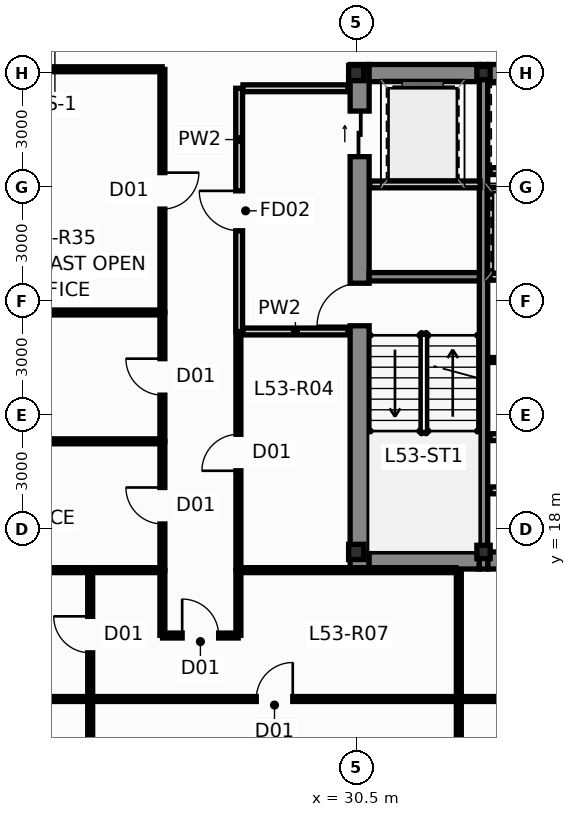
"""IFC4 building model, lengths in metres.
Left out: names, types, materials, properties, quantities, classifications, styles, units other than length and angle.
Written with IfcOpenShell. Run it as: python <this file> out.ifc"""

import sys

from ifc_helpers import new_model, si_unit, direction, frame, frame_2d, origin, origin_2d, place, context, subcontext, project, spatial, rectangle, hollow_rectangle, i_section, extrude, source, transform, mapped, element, fill, save


model = new_model("IFC4")
c1 = context("Model", 3, precision=1e-05, world=origin(), true_north=direction((0.0, 1.0)))
c2 = subcontext(c1, "Body", "Model", "MODEL_VIEW")
j1 = project(units=[si_unit("LENGTHUNIT", "METRE"), si_unit("PLANEANGLEUNIT", "RADIAN")], contexts=[c1])
p1 = place(None, origin())
s1 = spatial("IfcSite", under=j1, at=p1, CompositionType="ELEMENT")
p2 = place(p1, origin())
s2 = spatial("IfcBuilding", under=s1, at=p2, CompositionType="ELEMENT")
p3 = place(p2, frame((0.0, 0.0, 202.3)))
s3 = spatial("IfcBuildingStorey", under=s2, at=p3, CompositionType="ELEMENT", Elevation=202.3)
m1 = source(origin(), c2, "Body", "SweptSolid", [
    extrude(i_section(OverallWidth=0.4, OverallDepth=0.4, WebThickness=0.02, FlangeThickness=0.032, at=origin_2d()), origin(), (0.0, 0.0, 1.0), 3.65),
])
for number, where, z_axis, x_axis in (
    (1, (30.5, 17.4, 0.0), (0.0, 0.0, 1.0), (1.0, 0.0, 0.0)),
    (2, (30.5, 30.0, 0.0), (0.0, 0.0, 1.0), (1.0, 0.0, 0.0)),
):
    element("IfcColumn", number, at=place(p3, frame(where, z_axis=z_axis, x_axis=x_axis)), inside=s3, PredefinedType="COLUMN", context=c2, shape_type="MappedRepresentation", body=[
        mapped(m1, transform((0.0, 0.0, 0.0), scale=1.0)),
    ])
m2 = source(origin(), c2, "Body", "SweptSolid", [
    extrude(hollow_rectangle(XDim=0.35, YDim=0.35, WallThickness=0.016, at=origin_2d()), origin(), (0.0, 0.0, 1.0), 3.65),
])
for number, where, z_axis, x_axis in (
    (3, (33.85, 17.4, 0.0), (0.0, 0.0, 1.0), (1.0, 0.0, 0.0)),
    (4, (33.85, 30.0, 0.0), (0.0, 0.0, 1.0), (1.0, 0.0, 0.0)),
):
    element("IfcColumn", number, at=place(p3, frame(where, z_axis=z_axis, x_axis=x_axis)), inside=s3, PredefinedType="COLUMN", context=c2, shape_type="MappedRepresentation", body=[
        mapped(m2, transform((0.0, 0.0, 0.0), scale=1.0)),
    ])
p4 = place(p3, frame((30.59, 16.95, 0.0), z_axis=(0.0, 0.0, 1.0), x_axis=(0.0, 1.0, 0.0)))
e5 = element("IfcWall", 5, at=p4, inside=s3, PredefinedType="SHEAR", context=c2, shape_type="SweptSolid", body=[
    extrude(rectangle(XDim=13.275, YDim=0.5, at=frame_2d((6.638, 0.0))), origin(), (0.0, 0.0, 1.0), 3.65),
])
p5 = place(p4, frame((6.4, 0.0, 0.0)))
e6 = element("IfcOpeningElement", 6, at=p5, cuts=e5, PredefinedType="OPENING", context=c2, shape_type="SweptSolid", body=[
    extrude(rectangle(XDim=1.12, YDim=2.15, at=frame_2d((0.56, 1.075))), frame((0.0, 0.262, 0.0), z_axis=(0.0, -1.0, 0.0), x_axis=(1.0, 0.0, 0.0)), (0.0, 0.0, 1.0), 0.524),
])
p6 = place(p4, frame((10.85, 0.0, 0.0)))
e7 = element("IfcOpeningElement", 7, at=p6, cuts=e5, PredefinedType="OPENING", context=c2, shape_type="SweptSolid", body=[
    extrude(rectangle(XDim=1.2, YDim=2.2, at=frame_2d((0.6, 1.1))), frame((0.0, 0.262, 0.0), z_axis=(0.0, -1.0, 0.0), x_axis=(1.0, 0.0, 0.0)), (0.0, 0.0, 1.0), 0.524),
])
p7 = place(p3, frame((30.84, 17.175, 0.0), z_axis=(0.0, 0.0, 1.0), x_axis=(1.0, 0.0, 0.0)))
e8 = element("IfcWall", 8, at=p7, inside=s3, PredefinedType="SHEAR", context=c2, shape_type="SweptSolid", body=[
    extrude(rectangle(XDim=2.9, YDim=0.45, at=frame_2d((1.45, 0.0))), origin(), (0.0, 0.0, 1.0), 3.65),
])
p8 = place(p3, frame((33.96, 17.175, 0.0), z_axis=(0.0, 0.0, 1.0), x_axis=(1.0, 0.0, 0.0)))
e9 = element("IfcWall", 9, at=p8, inside=s3, PredefinedType="SHEAR", context=c2, shape_type="SweptSolid", body=[
    extrude(rectangle(XDim=8.08, YDim=0.45, at=frame_2d((4.04, 0.0))), origin(), (0.0, 0.0, 1.0), 3.65),
])
p9 = place(p3, frame((30.84, 30.0, 0.0), z_axis=(0.0, 0.0, 1.0), x_axis=(1.0, 0.0, 0.0)))
e10 = element("IfcWall", 10, at=p9, inside=s3, PredefinedType="SHEAR", context=c2, shape_type="SweptSolid", body=[
    extrude(rectangle(XDim=2.9, YDim=0.45, at=frame_2d((1.45, 0.0))), origin(), (0.0, 0.0, 1.0), 3.65),
])
p10 = place(p3, frame((33.96, 30.0, 0.0), z_axis=(0.0, 0.0, 1.0), x_axis=(1.0, 0.0, 0.0)))
e11 = element("IfcWall", 11, at=p10, inside=s3, PredefinedType="SHEAR", context=c2, shape_type="SweptSolid", body=[
    extrude(rectangle(XDim=3.78, YDim=0.45, at=frame_2d((1.89, 0.0))), origin(), (0.0, 0.0, 1.0), 3.65),
])
p11 = place(p3, frame((33.85, 16.95, 0.0), z_axis=(0.0, 0.0, 1.0), x_axis=(0.0, 1.0, 0.0)))
e12 = element("IfcWall", 12, at=p11, inside=s3, PredefinedType="SHEAR", context=c2, shape_type="SweptSolid", body=[
    extrude(rectangle(XDim=13.275, YDim=0.22, at=frame_2d((6.638, 0.0))), origin(), (0.0, 0.0, 1.0), 3.65),
])
p12 = place(p3, frame((30.84, 24.64, 0.0), z_axis=(0.0, 0.0, 1.0), x_axis=(1.0, 0.0, 0.0)))
e13 = element("IfcWall", 13, at=p12, inside=s3, PredefinedType="SHEAR", context=c2, shape_type="SweptSolid", body=[
    extrude(rectangle(XDim=2.9, YDim=0.22, at=frame_2d((1.45, 0.0))), origin(), (0.0, 0.0, 1.0), 3.65),
])
p13 = place(p3, frame((34.02, 26.9, 0.0), z_axis=(0.0, 0.0, 1.0), x_axis=(1.0, 0.0, 0.0)))
e14 = element("IfcWall", 14, at=p13, inside=s3, PredefinedType="PARTITIONING", context=c2, shape_type="SweptSolid", body=[
    extrude(rectangle(XDim=3.6, YDim=0.18, at=frame_2d((1.8, 0.0))), origin(), (0.0, 0.0, 1.0), 3.4),
])
p14 = place(p13, frame((0.3, 0.0, 0.0)))
e15 = element("IfcOpeningElement", 15, at=p14, cuts=e14, PredefinedType="OPENING", context=c2, shape_type="SweptSolid", body=[
    extrude(rectangle(XDim=1.15, YDim=2.2, at=frame_2d((0.575, 1.1))), frame((0.0, 0.102, 0.0), z_axis=(0.0, -1.0, 0.0), x_axis=(1.0, 0.0, 0.0)), (0.0, 0.0, 1.0), 0.204),
])
p15 = place(p13, frame((2.1, 0.0, 0.0)))
e16 = element("IfcOpeningElement", 16, at=p15, cuts=e14, PredefinedType="OPENING", context=c2, shape_type="SweptSolid", body=[
    extrude(rectangle(XDim=1.15, YDim=2.2, at=frame_2d((0.575, 1.1))), frame((0.0, 0.102, 0.0), z_axis=(0.0, -1.0, 0.0), x_axis=(1.0, 0.0, 0.0)), (0.0, 0.0, 1.0), 0.204),
])
p16 = place(p3, frame((34.02, 24.64, 0.0), z_axis=(0.0, 0.0, 1.0), x_axis=(1.0, 0.0, 0.0)))
e17 = element("IfcWall", 17, at=p16, inside=s3, PredefinedType="PARTITIONING", context=c2, shape_type="SweptSolid", body=[
    extrude(rectangle(XDim=3.68, YDim=0.18, at=frame_2d((1.84, 0.0))), origin(), (0.0, 0.0, 1.0), 3.4),
])
p17 = place(p3, frame((34.02, 27.42, 0.0), z_axis=(0.0, 0.0, 1.0), x_axis=(1.0, 0.0, 0.0)))
e18 = element("IfcWall", 18, at=p17, inside=s3, PredefinedType="PARTITIONING", context=c2, shape_type="SweptSolid", body=[
    extrude(rectangle(XDim=3.66, YDim=0.18, at=frame_2d((1.83, 0.0))), origin(), (0.0, 0.0, 1.0), 3.4),
])
p18 = place(p3, frame((27.42, 23.2, 0.0), z_axis=(0.0, 0.0, 1.0), x_axis=(0.0, 1.0, 0.0)))
e19 = element("IfcWall", 19, at=p18, inside=s3, PredefinedType="PARTITIONING", context=c2, shape_type="SweptSolid", body=[
    extrude(rectangle(XDim=6.4, YDim=0.18, at=frame_2d((3.2, 0.0))), origin(), (0.0, 0.0, 1.0), 3.078),
])
p19 = place(p18, frame((2.65, 0.0, 0.0)))
e20 = element("IfcOpeningElement", 20, at=p19, cuts=e19, PredefinedType="OPENING", context=c2, shape_type="SweptSolid", body=[
    extrude(rectangle(XDim=1.05, YDim=2.15, at=frame_2d((0.525, 1.075))), frame((0.0, 0.102, 0.0), z_axis=(0.0, -1.0, 0.0), x_axis=(1.0, 0.0, 0.0)), (0.0, 0.0, 1.0), 0.204),
])
p20 = place(p3, frame((27.52, 23.2, 0.0), z_axis=(0.0, 0.0, 1.0), x_axis=(1.0, 0.0, 0.0)))
e21 = element("IfcWall", 21, at=p20, inside=s3, PredefinedType="PARTITIONING", context=c2, shape_type="SweptSolid", body=[
    extrude(rectangle(XDim=2.76, YDim=0.18, at=frame_2d((1.38, 0.0))), origin(), (0.0, 0.0, 1.0), 3.4),
])
p21 = place(p3, frame((27.52, 29.6, 0.0), z_axis=(0.0, 0.0, 1.0), x_axis=(1.0, 0.0, 0.0)))
e22 = element("IfcWall", 22, at=p21, inside=s3, PredefinedType="PARTITIONING", context=c2, shape_type="SweptSolid", body=[
    extrude(rectangle(XDim=2.76, YDim=0.18, at=frame_2d((1.38, 0.0))), origin(), (0.0, 0.0, 1.0), 2.925),
])
p22 = place(p3, frame((30.86, 27.07, 0.0), z_axis=(0.0, 0.0, 1.0), x_axis=(1.0, 0.0, 0.0)))
e23 = element("IfcWall", 23, at=p22, inside=s3, PredefinedType="PARTITIONING", context=c2, shape_type="SweptSolid", body=[
    extrude(rectangle(XDim=2.9, YDim=0.18, at=frame_2d((1.45, 0.0))), origin(), (0.0, 0.0, 1.0), 3.4),
])
p23 = place(p3, frame((34.02, 20.42, 0.0), z_axis=(0.0, 0.0, 1.0), x_axis=(1.0, 0.0, 0.0)))
e24 = element("IfcWall", 24, at=p23, inside=s3, PredefinedType="PARTITIONING", context=c2, shape_type="SweptSolid", body=[
    extrude(rectangle(XDim=3.64, YDim=0.18, at=frame_2d((1.82, 0.0))), origin(), (0.0, 0.0, 1.0), 3.4),
])
p24 = place(p3, frame((34.02, 22.45, 0.0), z_axis=(0.0, 0.0, 1.0), x_axis=(1.0, 0.0, 0.0)))
e25 = element("IfcWall", 25, at=p24, inside=s3, PredefinedType="PARTITIONING", context=c2, shape_type="SweptSolid", body=[
    extrude(rectangle(XDim=3.58, YDim=0.13, at=frame_2d((1.79, 0.0))), origin(), (0.0, 0.0, 1.0), 3.4),
])
p25 = place(p3, frame((34.02, 19.02, 0.0), z_axis=(0.0, 0.0, 1.0), x_axis=(1.0, 0.0, 0.0)))
e26 = element("IfcWall", 26, at=p25, inside=s3, PredefinedType="PARTITIONING", context=c2, shape_type="SweptSolid", body=[
    extrude(rectangle(XDim=3.58, YDim=0.18, at=frame_2d((1.79, 0.0))), origin(), (0.0, 0.0, 1.0), 3.4),
])
p26 = place(p3, frame((12.078, 13.53, 0.0), z_axis=(0.0, 0.0, 1.0), x_axis=(1.0, 0.0, 0.0)))
e27 = element("IfcWall", 27, at=p26, inside=s3, PredefinedType="PARTITIONING", context=c2, shape_type="SweptSolid", body=[
    extrude(rectangle(XDim=11.417, YDim=0.13, at=frame_2d((5.708, 0.0))), origin(), (0.0, 0.0, 1.0), 3.4),
])
p27 = place(p26, frame((5.283, 0.0, 0.0)))
e28 = element("IfcOpeningElement", 28, at=p27, cuts=e27, PredefinedType="OPENING", context=c2, shape_type="SweptSolid", body=[
    extrude(rectangle(XDim=0.96, YDim=2.15, at=frame_2d((0.48, 1.075))), frame((0.0, 0.077, 0.0), z_axis=(0.0, -1.0, 0.0), x_axis=(1.0, 0.0, 0.0)), (0.0, 0.0, 1.0), 0.154),
])
p28 = place(p3, frame((23.505, 13.53, 0.0), z_axis=(0.0, 0.0, 1.0), x_axis=(1.0, 0.0, 0.0)))
e29 = element("IfcWall", 29, at=p28, inside=s3, PredefinedType="PARTITIONING", context=c2, shape_type="SweptSolid", body=[
    extrude(rectangle(XDim=9.69, YDim=0.13, at=frame_2d((4.845, 0.0))), origin(), (0.0, 0.0, 1.0), 3.078),
])
p29 = place(p28, frame((4.365, 0.0, 0.0)))
e30 = element("IfcOpeningElement", 30, at=p29, cuts=e29, PredefinedType="OPENING", context=c2, shape_type="SweptSolid", body=[
    extrude(rectangle(XDim=0.96, YDim=2.15, at=frame_2d((0.48, 1.075))), frame((0.0, 0.077, 0.0), z_axis=(0.0, -1.0, 0.0), x_axis=(1.0, 0.0, 0.0)), (0.0, 0.0, 1.0), 0.154),
])
p30 = place(p3, frame((33.205, 13.53, 0.0), z_axis=(0.0, 0.0, 1.0), x_axis=(1.0, 0.0, 0.0)))
e31 = element("IfcWall", 31, at=p30, inside=s3, PredefinedType="PARTITIONING", context=c2, shape_type="SweptSolid", body=[
    extrude(rectangle(XDim=9.59, YDim=0.13, at=frame_2d((4.795, 0.0))), origin(), (0.0, 0.0, 1.0), 3.078),
])
p31 = place(p30, frame((4.315, 0.0, 0.0)))
e32 = element("IfcOpeningElement", 32, at=p31, cuts=e31, PredefinedType="OPENING", context=c2, shape_type="SweptSolid", body=[
    extrude(rectangle(XDim=0.96, YDim=2.15, at=frame_2d((0.48, 1.075))), frame((0.0, 0.077, 0.0), z_axis=(0.0, -1.0, 0.0), x_axis=(1.0, 0.0, 0.0)), (0.0, 0.0, 1.0), 0.154),
])
p32 = place(p3, frame((14.069, 16.92, 0.0), z_axis=(0.0, 0.0, 1.0), x_axis=(1.0, 0.0, 0.0)))
e33 = element("IfcWall", 33, at=p32, inside=s3, PredefinedType="PARTITIONING", context=c2, shape_type="SweptSolid", body=[
    extrude(rectangle(XDim=9.426, YDim=0.13, at=frame_2d((4.713, 0.0))), origin(), (0.0, 0.0, 1.0), 2.925),
])
p33 = place(p3, frame((16.06, 20.31, 0.0), z_axis=(0.0, 0.0, 1.0), x_axis=(1.0, 0.0, 0.0)))
e34 = element("IfcWall", 34, at=p33, inside=s3, PredefinedType="PARTITIONING", context=c2, shape_type="SweptSolid", body=[
    extrude(rectangle(XDim=9.335, YDim=0.13, at=frame_2d((4.667, 0.0))), origin(), (0.0, 0.0, 1.0), 3.4),
])
p34 = place(p3, frame((18.051, 23.7, 0.0), z_axis=(0.0, 0.0, 1.0), x_axis=(1.0, 0.0, 0.0)))
e35 = element("IfcWall", 35, at=p34, inside=s3, PredefinedType="PARTITIONING", context=c2, shape_type="SweptSolid", body=[
    extrude(rectangle(XDim=7.344, YDim=0.13, at=frame_2d((3.672, 0.0))), origin(), (0.0, 0.0, 1.0), 3.4),
])
p35 = place(p3, frame((25.4, 30.095, 0.0), z_axis=(0.0, 0.0, 1.0), x_axis=(0.0, -1.0, 0.0)))
e36 = element("IfcWall", 36, at=p35, inside=s3, PredefinedType="PARTITIONING", context=c2, shape_type="SweptSolid", body=[
    extrude(rectangle(XDim=6.39, YDim=0.13, at=frame_2d((3.195, 0.0))), origin(), (0.0, 0.0, 1.0), 3.078),
])
p36 = place(p35, frame((2.715, 0.0, 0.0)))
e37 = element("IfcOpeningElement", 37, at=p36, cuts=e36, PredefinedType="OPENING", context=c2, shape_type="SweptSolid", body=[
    extrude(rectangle(XDim=0.96, YDim=2.15, at=frame_2d((0.48, 1.075))), frame((0.0, 0.077, 0.0), z_axis=(0.0, -1.0, 0.0), x_axis=(1.0, 0.0, 0.0)), (0.0, 0.0, 1.0), 0.154),
])
p37 = place(p3, frame((27.4, 16.925, 0.0), z_axis=(0.0, 0.0, 1.0), x_axis=(0.0, 1.0, 0.0)))
e38 = element("IfcWall", 38, at=p37, inside=s3, PredefinedType="PARTITIONING", context=c2, shape_type="SweptSolid", body=[
    extrude(rectangle(XDim=6.18, YDim=0.13, at=frame_2d((3.09, 0.0))), origin(), (0.0, 0.0, 1.0), 3.078),
])
p38 = place(p37, frame((2.61, 0.0, 0.0)))
e39 = element("IfcOpeningElement", 39, at=p38, cuts=e38, PredefinedType="OPENING", context=c2, shape_type="SweptSolid", body=[
    extrude(rectangle(XDim=0.96, YDim=2.15, at=frame_2d((0.48, 1.075))), frame((0.0, 0.077, 0.0), z_axis=(0.0, -1.0, 0.0), x_axis=(1.0, 0.0, 0.0)), (0.0, 0.0, 1.0), 0.154),
])
p39 = place(p3, frame((27.405, 16.92, 0.0), z_axis=(0.0, 0.0, 1.0), x_axis=(1.0, 0.0, 0.0)))
e40 = element("IfcWall", 40, at=p39, inside=s3, PredefinedType="PARTITIONING", context=c2, shape_type="SweptSolid", body=[
    extrude(rectangle(XDim=5.72, YDim=0.13, at=frame_2d((2.86, 0.0))), origin(), (0.0, 0.0, 1.0), 2.925),
])
p40 = place(p3, frame((21.81, 30.1, 0.0), z_axis=(0.0, 0.0, 1.0), x_axis=(1.0, 0.0, 0.0)))
e41 = element("IfcWall", 41, at=p40, inside=s3, PredefinedType="PARTITIONING", context=c2, shape_type="SweptSolid", body=[
    extrude(rectangle(XDim=3.585, YDim=0.13, at=frame_2d((1.793, 0.0))), origin(), (0.0, 0.0, 1.0), 3.4),
])
p41 = place(p3, frame((23.5, 13.535, 0.0), z_axis=(0.0, 0.0, 1.0), x_axis=(0.0, 1.0, 0.0)))
e42 = element("IfcWall", 42, at=p41, inside=s3, PredefinedType="PARTITIONING", context=c2, shape_type="SweptSolid", body=[
    extrude(rectangle(XDim=3.38, YDim=0.13, at=frame_2d((1.69, 0.0))), origin(), (0.0, 0.0, 1.0), 3.4),
])
p42 = place(p41, frame((1.21, 0.0, 0.0)))
e43 = element("IfcOpeningElement", 43, at=p42, cuts=e42, PredefinedType="OPENING", context=c2, shape_type="SweptSolid", body=[
    extrude(rectangle(XDim=0.96, YDim=2.15, at=frame_2d((0.48, 1.075))), frame((0.0, 0.077, 0.0), z_axis=(0.0, -1.0, 0.0), x_axis=(1.0, 0.0, 0.0)), (0.0, 0.0, 1.0), 0.154),
])
p43 = place(p3, frame((33.2, 13.535, 0.0), z_axis=(0.0, 0.0, 1.0), x_axis=(0.0, 1.0, 0.0)))
e44 = element("IfcWall", 44, at=p43, inside=s3, PredefinedType="PARTITIONING", context=c2, shape_type="SweptSolid", body=[
    extrude(rectangle(XDim=3.31, YDim=0.13, at=frame_2d((1.655, 0.0))), origin(), (0.0, 0.0, 1.0), 3.4),
])
p44 = place(p3, frame((25.4, 20.315, 0.0), z_axis=(0.0, 0.0, 1.0), x_axis=(0.0, 1.0, 0.0)))
e45 = element("IfcWall", 45, at=p44, inside=s3, PredefinedType="PARTITIONING", context=c2, shape_type="SweptSolid", body=[
    extrude(rectangle(XDim=3.38, YDim=0.13, at=frame_2d((1.69, 0.0))), origin(), (0.0, 0.0, 1.0), 3.078),
])
p45 = place(p44, frame((1.21, 0.0, 0.0)))
e46 = element("IfcOpeningElement", 46, at=p45, cuts=e45, PredefinedType="OPENING", context=c2, shape_type="SweptSolid", body=[
    extrude(rectangle(XDim=0.96, YDim=2.15, at=frame_2d((0.48, 1.075))), frame((0.0, 0.077, 0.0), z_axis=(0.0, -1.0, 0.0), x_axis=(1.0, 0.0, 0.0)), (0.0, 0.0, 1.0), 0.154),
])
p46 = place(p3, frame((23.5, 10.145, 0.0), z_axis=(0.0, 0.0, 1.0), x_axis=(0.0, 1.0, 0.0)))
e47 = element("IfcWall", 47, at=p46, inside=s3, PredefinedType="PARTITIONING", context=c2, shape_type="SweptSolid", body=[
    extrude(rectangle(XDim=3.38, YDim=0.13, at=frame_2d((1.69, 0.0))), origin(), (0.0, 0.0, 1.0), 3.4),
])
p47 = place(p3, frame((33.2, 10.145, 0.0), z_axis=(0.0, 0.0, 1.0), x_axis=(0.0, 1.0, 0.0)))
e48 = element("IfcWall", 48, at=p47, inside=s3, PredefinedType="PARTITIONING", context=c2, shape_type="SweptSolid", body=[
    extrude(rectangle(XDim=3.38, YDim=0.13, at=frame_2d((1.69, 0.0))), origin(), (0.0, 0.0, 1.0), 3.4),
])
p48 = place(p47, frame((1.21, 0.0, 0.0)))
e49 = element("IfcOpeningElement", 49, at=p48, cuts=e48, PredefinedType="OPENING", context=c2, shape_type="SweptSolid", body=[
    extrude(rectangle(XDim=0.96, YDim=2.15, at=frame_2d((0.48, 1.075))), frame((0.0, 0.077, 0.0), z_axis=(0.0, -1.0, 0.0), x_axis=(1.0, 0.0, 0.0)), (0.0, 0.0, 1.0), 0.154),
])
p49 = place(p3, frame((25.4, 16.925, 0.0), z_axis=(0.0, 0.0, 1.0), x_axis=(0.0, 1.0, 0.0)))
e50 = element("IfcWall", 50, at=p49, inside=s3, PredefinedType="PARTITIONING", context=c2, shape_type="SweptSolid", body=[
    extrude(rectangle(XDim=3.38, YDim=0.13, at=frame_2d((1.69, 0.0))), origin(), (0.0, 0.0, 1.0), 3.078),
])
p50 = place(p49, frame((1.21, 0.0, 0.0)))
e51 = element("IfcOpeningElement", 51, at=p50, cuts=e50, PredefinedType="OPENING", context=c2, shape_type="SweptSolid", body=[
    extrude(rectangle(XDim=0.96, YDim=2.15, at=frame_2d((0.48, 1.075))), frame((0.0, 0.077, 0.0), z_axis=(0.0, -1.0, 0.0), x_axis=(1.0, 0.0, 0.0)), (0.0, 0.0, 1.0), 0.154),
])
p51 = place(p3, frame((25.405, 15.2, 0.0), z_axis=(0.0, 0.0, 1.0), x_axis=(1.0, 0.0, 0.0)))
e52 = element("IfcWall", 52, at=p51, inside=s3, PredefinedType="PARTITIONING", context=c2, shape_type="SweptSolid", body=[
    extrude(rectangle(XDim=1.99, YDim=0.13, at=frame_2d((0.995, 0.0))), origin(), (0.0, 0.0, 1.0), 3.4),
])
p52 = place(p51, frame((0.515, 0.0, 0.0)))
e53 = element("IfcOpeningElement", 53, at=p52, cuts=e52, PredefinedType="OPENING", context=c2, shape_type="SweptSolid", body=[
    extrude(rectangle(XDim=0.96, YDim=2.15, at=frame_2d((0.48, 1.075))), frame((0.0, 0.077, 0.0), z_axis=(0.0, -1.0, 0.0), x_axis=(1.0, 0.0, 0.0)), (0.0, 0.0, 1.0), 0.154),
])
p53 = place(p3, frame((23.505, 16.92, 0.0), z_axis=(0.0, 0.0, 1.0), x_axis=(1.0, 0.0, 0.0)))
e54 = element("IfcWall", 54, at=p53, inside=s3, PredefinedType="PARTITIONING", context=c2, shape_type="SweptSolid", body=[
    extrude(rectangle(XDim=1.89, YDim=0.13, at=frame_2d((0.945, 0.0))), origin(), (0.0, 0.0, 1.0), 2.925),
])
for number, where, z_axis, x_axis in (
    (55, (25.4, 16.915, 0.0), (0.0, 0.0, 1.0), (0.0, -1.0, 0.0)),
    (56, (27.4, 15.205, 0.0), (0.0, 0.0, 1.0), (0.0, 1.0, 0.0)),
):
    element("IfcWall", number, at=place(p3, frame(where, z_axis=z_axis, x_axis=x_axis)), inside=s3, PredefinedType="PARTITIONING", context=c2, shape_type="SweptSolid", body=[
        extrude(rectangle(XDim=1.71, YDim=0.13, at=frame_2d((0.855, 0.0))), origin(), (0.0, 0.0, 1.0), 3.4),
    ])
p54 = place(p5, origin())
e57 = element("IfcDoor", 57, at=p54, inside=s3, OperationType="SINGLE_SWING_LEFT", PredefinedType="DOOR", context=c2, shape_type="SweptSolid", body=[
    extrude(rectangle(XDim=1.12, YDim=2.15, at=frame_2d((0.56, 1.075))), frame((0.0, 0.025, 0.0), z_axis=(0.0, -1.0, 0.0), x_axis=(1.0, 0.0, 0.0)), (0.0, 0.0, 1.0), 0.05),
])
fill(e6, e57)
p55 = place(p6, origin())
e58 = element("IfcDoor", 58, at=p55, inside=s3, OperationType="SLIDING_TO_LEFT", PredefinedType="DOOR", context=c2, shape_type="SweptSolid", body=[
    extrude(rectangle(XDim=1.2, YDim=2.2, at=frame_2d((0.6, 1.1))), frame((0.0, 0.025, 0.0), z_axis=(0.0, -1.0, 0.0), x_axis=(1.0, 0.0, 0.0)), (0.0, 0.0, 1.0), 0.05),
])
fill(e7, e58)
p56 = place(p19, origin())
e59 = element("IfcDoor", 59, at=p56, inside=s3, OperationType="SINGLE_SWING_RIGHT", PredefinedType="DOOR", context=c2, shape_type="SweptSolid", body=[
    extrude(rectangle(XDim=1.05, YDim=2.15, at=frame_2d((0.525, 1.075))), frame((0.0, 0.025, 0.0), z_axis=(0.0, -1.0, 0.0), x_axis=(1.0, 0.0, 0.0)), (0.0, 0.0, 1.0), 0.05),
])
fill(e20, e59)
p57 = place(p29, origin())
e60 = element("IfcDoor", 60, at=p57, inside=s3, OperationType="SINGLE_SWING_RIGHT", PredefinedType="DOOR", context=c2, shape_type="SweptSolid", body=[
    extrude(rectangle(XDim=0.96, YDim=2.15, at=frame_2d((0.48, 1.075))), frame((0.0, 0.025, 0.0), z_axis=(0.0, -1.0, 0.0), x_axis=(1.0, 0.0, 0.0)), (0.0, 0.0, 1.0), 0.05),
])
fill(e30, e60)
p58 = place(p36, origin())
e61 = element("IfcDoor", 61, at=p58, inside=s3, OperationType="SINGLE_SWING_LEFT", PredefinedType="DOOR", context=c2, shape_type="SweptSolid", body=[
    extrude(rectangle(XDim=0.96, YDim=2.15, at=frame_2d((0.48, 1.075))), frame((0.0, 0.025, 0.0), z_axis=(0.0, -1.0, 0.0), x_axis=(1.0, 0.0, 0.0)), (0.0, 0.0, 1.0), 0.05),
])
fill(e37, e61)
p59 = place(p38, origin())
e62 = element("IfcDoor", 62, at=p59, inside=s3, OperationType="SINGLE_SWING_LEFT", PredefinedType="DOOR", context=c2, shape_type="SweptSolid", body=[
    extrude(rectangle(XDim=0.96, YDim=2.15, at=frame_2d((0.48, 1.075))), frame((0.0, 0.025, 0.0), z_axis=(0.0, -1.0, 0.0), x_axis=(1.0, 0.0, 0.0)), (0.0, 0.0, 1.0), 0.05),
])
fill(e39, e62)
p60 = place(p42, origin())
e63 = element("IfcDoor", 63, at=p60, inside=s3, OperationType="SINGLE_SWING_RIGHT", PredefinedType="DOOR", context=c2, shape_type="SweptSolid", body=[
    extrude(rectangle(XDim=0.96, YDim=2.15, at=frame_2d((0.48, 1.075))), frame((0.0, 0.025, 0.0), z_axis=(0.0, -1.0, 0.0), x_axis=(1.0, 0.0, 0.0)), (0.0, 0.0, 1.0), 0.05),
])
fill(e43, e63)
p61 = place(p45, origin())
e64 = element("IfcDoor", 64, at=p61, inside=s3, OperationType="SINGLE_SWING_RIGHT", PredefinedType="DOOR", context=c2, shape_type="SweptSolid", body=[
    extrude(rectangle(XDim=0.96, YDim=2.15, at=frame_2d((0.48, 1.075))), frame((0.0, 0.025, 0.0), z_axis=(0.0, -1.0, 0.0), x_axis=(1.0, 0.0, 0.0)), (0.0, 0.0, 1.0), 0.05),
])
fill(e46, e64)
p62 = place(p50, origin())
e65 = element("IfcDoor", 65, at=p62, inside=s3, OperationType="SINGLE_SWING_RIGHT", PredefinedType="DOOR", context=c2, shape_type="SweptSolid", body=[
    extrude(rectangle(XDim=0.96, YDim=2.15, at=frame_2d((0.48, 1.075))), frame((0.0, 0.025, 0.0), z_axis=(0.0, -1.0, 0.0), x_axis=(1.0, 0.0, 0.0)), (0.0, 0.0, 1.0), 0.05),
])
fill(e51, e65)
p63 = place(p52, origin())
e66 = element("IfcDoor", 66, at=p63, inside=s3, OperationType="SINGLE_SWING_LEFT", PredefinedType="DOOR", context=c2, shape_type="SweptSolid", body=[
    extrude(rectangle(XDim=0.96, YDim=2.15, at=frame_2d((0.48, 1.075))), frame((0.0, 0.025, 0.0), z_axis=(0.0, -1.0, 0.0), x_axis=(1.0, 0.0, 0.0)), (0.0, 0.0, 1.0), 0.05),
])
fill(e53, e66)
save(model, sys.argv[1])
